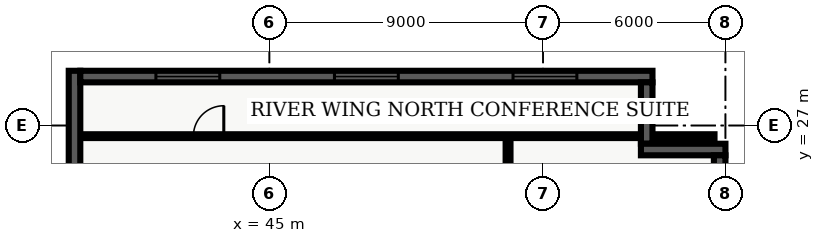
"""IFC4 building model, lengths in metres.
Left out: names, types, materials, properties, quantities, classifications, styles, units other than length and angle.
Written with IfcOpenShell. Run it as: python <this file> out.ifc"""

import sys

from ifc_helpers import new_model, entity, si_unit, converted_unit, direction, frame, origin_with_axes, origin_2d_with_axis, place, context, subcontext, project, spatial, polyline, rectangle, outline, extrude, element, fill, save


model = new_model("IFC4")
c1 = context("Model", 3, precision=1e-05, world=origin_with_axes(), true_north=direction((0.0, 1.0)))
c2 = subcontext(c1, "Body", "Model", "MODEL_VIEW")
j1 = project(units=[si_unit("LENGTHUNIT", "METRE"), converted_unit("PLANEANGLEUNIT", "DEGREE", entity("IfcPlaneAngleMeasure", 0.017), si_unit("PLANEANGLEUNIT", "RADIAN"), dimensions=[0, 0, 0, 0, 0, 0, 0])], contexts=[c1])
p1 = place(None, origin_with_axes())
s1 = spatial("IfcSite", under=j1, at=p1, CompositionType="ELEMENT")
p2 = place(p1, origin_with_axes())
s2 = spatial("IfcBuilding", under=s1, at=p2, CompositionType="ELEMENT")
p3 = place(p2, frame((0.0, 0.0, 56.1), z_axis=(0.0, 0.0, 1.0), x_axis=(1.0, 0.0, 0.0)))
s3 = spatial("IfcBuildingStorey", under=s2, at=p3, CompositionType="ELEMENT", Elevation=56.1)
p4 = place(p3, frame((52.85, 7.85, 0.0), z_axis=(0.0, 0.0, 1.0), x_axis=(0.0, 1.0, 0.0)))
e1 = element("IfcWall", 1, at=p4, inside=s3, PredefinedType="PARTITIONING", context=c2, shape_type="SweptSolid", body=[
    extrude(outline(polyline([(0.0, -0.08), (18.8, -0.08), (18.8, 0.08), (0.0, 0.08), (0.0, -0.08)])), origin_with_axes(), (0.0, 0.0, 1.0), 2.7),
])
p5 = place(p4, frame((4.4, 0.0, 0.0), z_axis=(0.0, 0.0, 1.0), x_axis=(1.0, 0.0, 0.0)))
e2 = element("IfcOpeningElement", 2, at=p5, cuts=e1, PredefinedType="OPENING", context=c2, shape_type="SweptSolid", body=[
    extrude(rectangle(XDim=1.0, YDim=0.18, at=origin_2d_with_axis()), origin_with_axes(), (0.0, 0.0, 1.0), 2.15),
])
p6 = place(p4, frame((7.799, 0.0, 0.0), z_axis=(0.0, 0.0, 1.0), x_axis=(1.0, 0.0, 0.0)))
e3 = element("IfcOpeningElement", 3, at=p6, cuts=e1, PredefinedType="OPENING", context=c2, shape_type="SweptSolid", body=[
    extrude(rectangle(XDim=1.0, YDim=0.18, at=origin_2d_with_axis()), origin_with_axes(), (0.0, 0.0, 1.0), 2.15),
])
p7 = place(p4, frame((14.034, 0.0, 0.0), z_axis=(0.0, 0.0, 1.0), x_axis=(1.0, 0.0, 0.0)))
e4 = element("IfcOpeningElement", 4, at=p7, cuts=e1, PredefinedType="OPENING", context=c2, shape_type="SweptSolid", body=[
    extrude(rectangle(XDim=1.0, YDim=0.18, at=origin_2d_with_axis()), origin_with_axes(), (0.0, 0.0, 1.0), 2.15),
])
p8 = place(p3, frame((38.76, 26.65, 0.0), z_axis=(0.0, 0.0, 1.0), x_axis=(1.0, 0.0, 0.0)))
e5 = element("IfcWall", 5, at=p8, inside=s3, PredefinedType="PARTITIONING", context=c2, shape_type="SweptSolid", body=[
    extrude(outline(polyline([(0.0, -0.062), (20.88, -0.062), (20.88, 0.062), (0.0, 0.062), (0.0, -0.062)])), origin_with_axes(), (0.0, 0.0, 1.0), 2.7),
])
p9 = place(p8, frame((4.24, 0.0, 0.0), z_axis=(0.0, 0.0, 1.0), x_axis=(1.0, 0.0, 0.0)))
e6 = element("IfcOpeningElement", 6, at=p9, cuts=e5, PredefinedType="OPENING", context=c2, shape_type="SweptSolid", body=[
    extrude(rectangle(XDim=1.0, YDim=0.145, at=origin_2d_with_axis()), origin_with_axes(), (0.0, 0.0, 1.0), 2.15),
])
p10 = place(p3, frame((38.59, 21.22, 0.0), z_axis=(0.0, 0.0, 1.0), x_axis=(0.0, 1.0, 0.0)))
e7 = element("IfcWall", 7, at=p10, inside=s3, PredefinedType="SOLIDWALL", context=c2, shape_type="SweptSolid", body=[
    extrude(outline(polyline([(0.0, -0.19), (7.58, -0.19), (7.58, 0.19), (0.0, 0.19), (0.0, -0.19)])), origin_with_axes(), (0.0, 0.0, 1.0), 3.66),
])
p11 = place(p3, frame((38.78, 28.61, 0.0), z_axis=(0.0, 0.0, 1.0), x_axis=(1.0, 0.0, 0.0)))
e8 = element("IfcWall", 8, at=p11, inside=s3, PredefinedType="SOLIDWALL", context=c2, shape_type="SweptSolid", body=[
    extrude(outline(polyline([(0.0, -0.19), (18.82, -0.19), (18.82, 0.19), (0.0, 0.19), (0.0, -0.19)])), origin_with_axes(), (0.0, 0.0, 1.0), 3.66),
])
p12 = place(p11, frame((3.537, 0.0, 0.45), z_axis=(0.0, 0.0, 1.0), x_axis=(1.0, 0.0, 0.0)))
e9 = element("IfcOpeningElement", 9, at=p12, cuts=e8, PredefinedType="OPENING", context=c2, shape_type="SweptSolid", body=[
    extrude(rectangle(XDim=2.1, YDim=0.4, at=origin_2d_with_axis()), origin_with_axes(), (0.0, 0.0, 1.0), 2.2),
])
p13 = place(p11, frame((9.41, 0.0, 0.45), z_axis=(0.0, 0.0, 1.0), x_axis=(1.0, 0.0, 0.0)))
e10 = element("IfcOpeningElement", 10, at=p13, cuts=e8, PredefinedType="OPENING", context=c2, shape_type="SweptSolid", body=[
    extrude(rectangle(XDim=2.1, YDim=0.4, at=origin_2d_with_axis()), origin_with_axes(), (0.0, 0.0, 1.0), 2.2),
])
p14 = place(p11, frame((15.283, 0.0, 0.45), z_axis=(0.0, 0.0, 1.0), x_axis=(1.0, 0.0, 0.0)))
e11 = element("IfcOpeningElement", 11, at=p14, cuts=e8, PredefinedType="OPENING", context=c2, shape_type="SweptSolid", body=[
    extrude(rectangle(XDim=2.1, YDim=0.4, at=origin_2d_with_axis()), origin_with_axes(), (0.0, 0.0, 1.0), 2.2),
])
p15 = place(p3, frame((57.41, 28.42, 0.0), z_axis=(0.0, 0.0, 1.0), x_axis=(0.0, -1.0, 0.0)))
e12 = element("IfcWall", 12, at=p15, inside=s3, PredefinedType="SOLIDWALL", context=c2, shape_type="SweptSolid", body=[
    extrude(outline(polyline([(0.0, -0.19), (2.02, -0.19), (2.02, 0.19), (0.0, 0.19), (0.0, -0.19)])), origin_with_axes(), (0.0, 0.0, 1.0), 3.66),
])
p16 = place(p3, frame((57.22, 26.21, 0.0), z_axis=(0.0, 0.0, 1.0), x_axis=(1.0, 0.0, 0.0)))
e13 = element("IfcWall", 13, at=p16, inside=s3, PredefinedType="SOLIDWALL", context=c2, shape_type="SweptSolid", body=[
    extrude(outline(polyline([(0.0, -0.19), (2.78, -0.19), (2.78, 0.19), (0.0, 0.19), (0.0, -0.19)])), origin_with_axes(), (0.0, 0.0, 1.0), 3.66),
])
p17 = place(p3, frame((59.81, 26.02, 0.0), z_axis=(0.0, 0.0, 1.0), x_axis=(0.0, -1.0, 0.0)))
e14 = element("IfcWall", 14, at=p17, inside=s3, PredefinedType="SOLIDWALL", context=c2, shape_type="SweptSolid", body=[
    extrude(outline(polyline([(0.0, -0.19), (23.62, -0.19), (23.62, 0.19), (0.0, 0.19), (0.0, -0.19)])), origin_with_axes(), (0.0, 0.0, 1.0), 3.66),
])
p18 = place(p17, frame((3.853, 0.0, 0.45), z_axis=(0.0, 0.0, 1.0), x_axis=(1.0, 0.0, 0.0)))
e15 = element("IfcOpeningElement", 15, at=p18, cuts=e14, PredefinedType="OPENING", context=c2, shape_type="SweptSolid", body=[
    extrude(rectangle(XDim=2.1, YDim=0.4, at=origin_2d_with_axis()), origin_with_axes(), (0.0, 0.0, 1.0), 2.2),
])
p19 = place(p17, frame((20.218, 0.0, 0.45), z_axis=(0.0, 0.0, 1.0), x_axis=(1.0, 0.0, 0.0)))
e16 = element("IfcOpeningElement", 16, at=p19, cuts=e14, PredefinedType="OPENING", context=c2, shape_type="SweptSolid", body=[
    extrude(rectangle(XDim=2.1, YDim=0.4, at=origin_2d_with_axis()), origin_with_axes(), (0.0, 0.0, 1.0), 2.2),
])
p20 = place(p8, frame((4.24, 0.0, 0.0), z_axis=(0.0, 0.0, 1.0), x_axis=(1.0, 0.0, 0.0)))
e17 = element("IfcDoor", 17, at=p20, inside=s3, OperationType="SINGLE_SWING_RIGHT", PredefinedType="DOOR", context=c2, shape_type="SweptSolid", body=[
    extrude(rectangle(XDim=1.0, YDim=0.075, at=origin_2d_with_axis()), origin_with_axes(), (0.0, 0.0, 1.0), 2.15),
])
fill(e6, e17)
p21 = place(p11, frame((3.537, 0.0, 0.45), z_axis=(0.0, 0.0, 1.0), x_axis=(1.0, 0.0, 0.0)))
e18 = element("IfcWindow", 18, at=p21, inside=s3, PredefinedType="WINDOW", context=c2, shape_type="SweptSolid", body=[
    extrude(rectangle(XDim=2.1, YDim=0.09, at=origin_2d_with_axis()), origin_with_axes(), (0.0, 0.0, 1.0), 2.2),
])
fill(e9, e18)
p22 = place(p11, frame((9.41, 0.0, 0.45), z_axis=(0.0, 0.0, 1.0), x_axis=(1.0, 0.0, 0.0)))
e19 = element("IfcWindow", 19, at=p22, inside=s3, PredefinedType="WINDOW", context=c2, shape_type="SweptSolid", body=[
    extrude(rectangle(XDim=2.1, YDim=0.09, at=origin_2d_with_axis()), origin_with_axes(), (0.0, 0.0, 1.0), 2.2),
])
fill(e10, e19)
p23 = place(p11, frame((15.283, 0.0, 0.45), z_axis=(0.0, 0.0, 1.0), x_axis=(1.0, 0.0, 0.0)))
e20 = element("IfcWindow", 20, at=p23, inside=s3, PredefinedType="WINDOW", context=c2, shape_type="SweptSolid", body=[
    extrude(rectangle(XDim=2.1, YDim=0.09, at=origin_2d_with_axis()), origin_with_axes(), (0.0, 0.0, 1.0), 2.2),
])
fill(e11, e20)
save(model, sys.argv[1])
